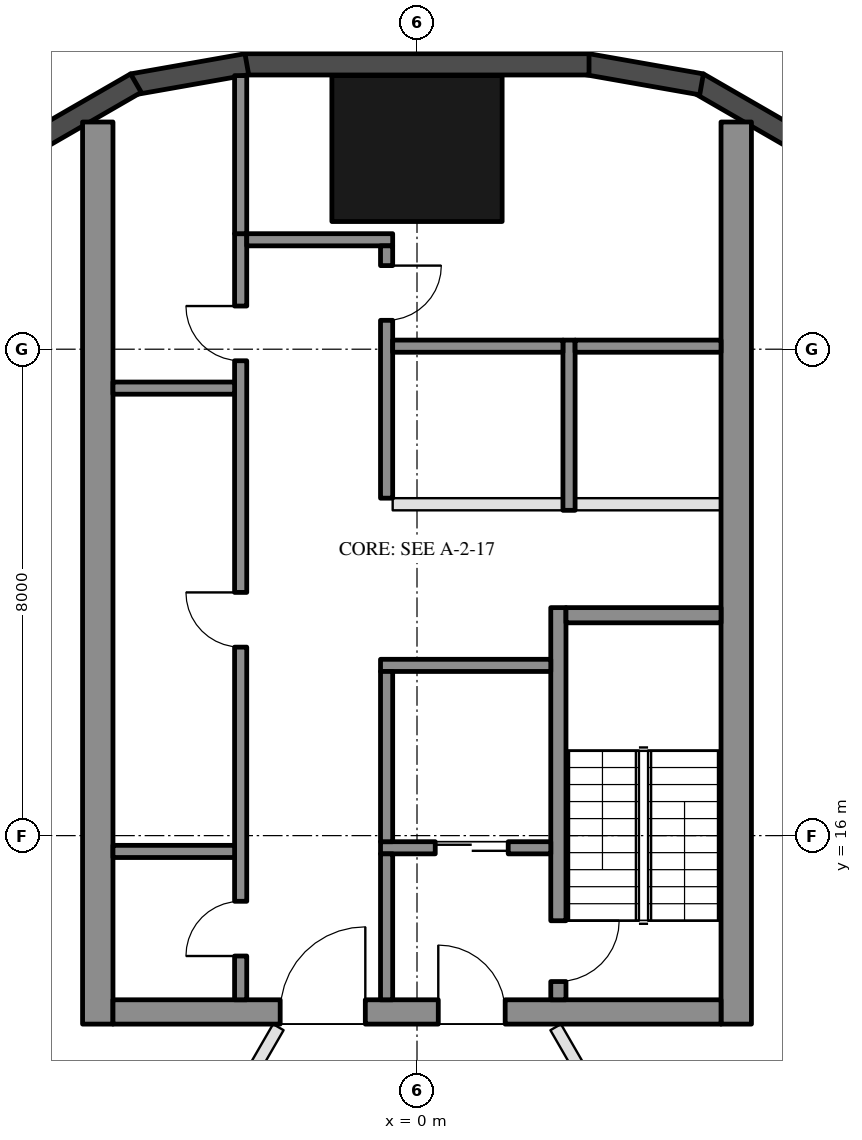
"""IFC4 building model, lengths in metres.
Left out: names, types, materials, properties, quantities, classifications, styles, units other than length and angle.
Written with IfcOpenShell. Run it as: python <this file> out.ifc"""

import sys

from ifc_helpers import new_model, si_unit, direction, frame, frame_2d, origin, origin_2d, place, context, subcontext, project, spatial, rectangle, hollow_rectangle, extrude, element, fill, save


model = new_model("IFC4")
c1 = context("Model", 3, precision=1e-05, world=origin(), true_north=direction((0.0, 1.0)))
c2 = subcontext(c1, "Body", "Model", "MODEL_VIEW")
j1 = project(units=[si_unit("LENGTHUNIT", "METRE"), si_unit("PLANEANGLEUNIT", "RADIAN")], contexts=[c1])
p1 = place(None, origin())
s1 = spatial("IfcSite", under=j1, at=p1, CompositionType="ELEMENT")
p2 = place(p1, origin())
s2 = spatial("IfcBuilding", under=s1, at=p2, CompositionType="ELEMENT")
p3 = place(p2, frame((0.0, 0.0, 83.5)))
s3 = spatial("IfcBuildingStorey", under=s2, at=p3, CompositionType="ELEMENT", Elevation=83.5)
p4 = place(p3, frame((0.0, 27.3, 0.0), z_axis=(0.0, 0.0, 1.0), x_axis=(1.0, 0.0, 0.0)))
e1 = element("IfcColumn", 1, at=p4, inside=s3, PredefinedType="COLUMN", context=c2, shape_type="SweptSolid", body=[
    extrude(hollow_rectangle(XDim=2.8, YDim=2.4, WallThickness=0.07, at=origin_2d()), origin(), (0.0, 0.0, 1.0), 3.7),
])
for number, where, z_axis, x_axis in (
    (2, (6.277, 27.422, 0.0), (0.0, 0.0, 1.0), (-0.866, 0.5, 0.0)),
    (3, (4.68, 28.356, 0.0), (0.0, 0.0, 1.0), (-0.985, 0.174, 0.0)),
):
    element("IfcWall", number, at=place(p3, frame(where, z_axis=z_axis, x_axis=x_axis)), inside=s3, PredefinedType="SOLIDWALL", context=c2, shape_type="SweptSolid", body=[
        extrude(rectangle(XDim=1.91, YDim=0.35, at=frame_2d((0.955, 0.0))), origin(), (0.0, 0.0, 1.0), 3.55),
    ])
p5 = place(p3, frame((2.829, 28.685, 0.0), z_axis=(0.0, 0.0, 1.0), x_axis=(-1.0, 0.0, 0.0)))
e4 = element("IfcWall", 4, at=p5, inside=s3, PredefinedType="SOLIDWALL", context=c2, shape_type="SweptSolid", body=[
    extrude(rectangle(XDim=5.658, YDim=0.35, at=frame_2d((2.829, 0.0))), origin(), (0.0, 0.0, 1.0), 3.55),
])
for number, where, z_axis, x_axis in (
    (5, (-2.799, 28.688, 0.0), (0.0, 0.0, 1.0), (-0.985, -0.174, 0.0)),
    (6, (-4.623, 28.377, 0.0), (0.0, 0.0, 1.0), (-0.866, -0.5, 0.0)),
):
    element("IfcWall", number, at=place(p3, frame(where, z_axis=z_axis, x_axis=x_axis)), inside=s3, PredefinedType="SOLIDWALL", context=c2, shape_type="SweptSolid", body=[
        extrude(rectangle(XDim=1.91, YDim=0.35, at=frame_2d((0.955, 0.0))), origin(), (0.0, 0.0, 1.0), 3.55),
    ])
for number, where, z_axis, x_axis in (
    (7, (5.25, 12.9, 0.0), (0.0, 0.0, 1.0), (0.0, 1.0, 0.0)),
    (8, (-5.25, 12.9, 0.0), (0.0, 0.0, 1.0), (0.0, 1.0, 0.0)),
):
    element("IfcWall", number, at=place(p3, frame(where, z_axis=z_axis, x_axis=x_axis)), inside=s3, PredefinedType="SHEAR", context=c2, shape_type="SweptSolid", body=[
        extrude(rectangle(XDim=14.837, YDim=0.5, at=frame_2d((7.418, 0.0))), origin(), (0.0, 0.0, 1.0), 3.5),
    ])
p6 = place(p3, frame((5.0, 13.1, 0.0), z_axis=(0.0, 0.0, 1.0), x_axis=(-1.0, 0.0, 0.0)))
e9 = element("IfcWall", 9, at=p6, inside=s3, PredefinedType="SHEAR", context=c2, shape_type="SweptSolid", body=[
    extrude(rectangle(XDim=10.0, YDim=0.4, at=frame_2d((5.0, 0.0))), origin(), (0.0, 0.0, 1.0), 3.5),
])
p7 = place(p6, frame((3.55, 0.0, 0.0)))
e10 = element("IfcOpeningElement", 10, at=p7, cuts=e9, PredefinedType="OPENING", context=c2, shape_type="SweptSolid", body=[
    extrude(rectangle(XDim=1.1, YDim=2.1, at=frame_2d((0.55, 1.05))), frame((0.0, 0.21, 0.0), z_axis=(0.0, -1.0, 0.0), x_axis=(1.0, 0.0, 0.0)), (0.0, 0.0, 1.0), 0.42),
])
p8 = place(p6, frame((5.85, 0.0, 0.0)))
e11 = element("IfcOpeningElement", 11, at=p8, cuts=e9, PredefinedType="OPENING", context=c2, shape_type="SweptSolid", body=[
    extrude(rectangle(XDim=1.4, YDim=2.1, at=frame_2d((0.7, 1.05))), frame((0.0, 0.21, 0.0), z_axis=(0.0, -1.0, 0.0), x_axis=(1.0, 0.0, 0.0)), (0.0, 0.0, 1.0), 0.42),
])
p9 = place(p3, frame((2.325, 13.3, 0.0), z_axis=(0.0, 0.0, 1.0), x_axis=(0.0, 1.0, 0.0)))
e12 = element("IfcWall", 12, at=p9, inside=s3, PredefinedType="SHEAR", context=c2, shape_type="SweptSolid", body=[
    extrude(rectangle(XDim=6.45, YDim=0.25, at=frame_2d((3.225, 0.0))), origin(), (0.0, 0.0, 1.0), 3.5),
])
p10 = place(p9, frame((0.3, 0.0, 0.0)))
e13 = element("IfcOpeningElement", 13, at=p10, cuts=e12, PredefinedType="OPENING", context=c2, shape_type="SweptSolid", body=[
    extrude(rectangle(XDim=1.0, YDim=2.1, at=frame_2d((0.5, 1.05))), frame((0.0, 0.135, 0.0), z_axis=(0.0, -1.0, 0.0), x_axis=(1.0, 0.0, 0.0)), (0.0, 0.0, 1.0), 0.27),
])
p11 = place(p3, frame((5.0, 19.625, 0.0), z_axis=(0.0, 0.0, 1.0), x_axis=(-1.0, 0.0, 0.0)))
e14 = element("IfcWall", 14, at=p11, inside=s3, PredefinedType="SHEAR", context=c2, shape_type="SweptSolid", body=[
    extrude(rectangle(XDim=2.55, YDim=0.25, at=frame_2d((1.275, 0.0))), origin(), (0.0, 0.0, 1.0), 3.5),
])
p12 = place(p3, frame((2.2, 18.8, 0.0), z_axis=(0.0, 0.0, 1.0), x_axis=(-1.0, 0.0, 0.0)))
e15 = element("IfcWall", 15, at=p12, inside=s3, PredefinedType="SHEAR", context=c2, shape_type="SweptSolid", body=[
    extrude(rectangle(XDim=2.8, YDim=0.2, at=frame_2d((1.4, 0.0))), origin(), (0.0, 0.0, 1.0), 3.5),
])
p13 = place(p3, frame((2.2, 15.8, 0.0), z_axis=(0.0, 0.0, 1.0), x_axis=(-1.0, 0.0, 0.0)))
e16 = element("IfcWall", 16, at=p13, inside=s3, PredefinedType="SHEAR", context=c2, shape_type="SweptSolid", body=[
    extrude(rectangle(XDim=2.8, YDim=0.2, at=frame_2d((1.4, 0.0))), origin(), (0.0, 0.0, 1.0), 3.5),
])
p14 = place(p13, frame((0.7, 0.0, 0.0)))
e17 = element("IfcOpeningElement", 17, at=p14, cuts=e16, PredefinedType="OPENING", context=c2, shape_type="SweptSolid", body=[
    extrude(rectangle(XDim=1.2, YDim=2.1, at=frame_2d((0.6, 1.05))), frame((0.0, 0.11, 0.0), z_axis=(0.0, -1.0, 0.0), x_axis=(1.0, 0.0, 0.0)), (0.0, 0.0, 1.0), 0.22),
])
p15 = place(p3, frame((-0.5, 15.9, 0.0), z_axis=(0.0, 0.0, 1.0), x_axis=(0.0, 1.0, 0.0)))
e18 = element("IfcWall", 18, at=p15, inside=s3, PredefinedType="SHEAR", context=c2, shape_type="SweptSolid", body=[
    extrude(rectangle(XDim=2.8, YDim=0.2, at=frame_2d((1.4, 0.0))), origin(), (0.0, 0.0, 1.0), 3.5),
])
p16 = place(p3, frame((-0.5, 13.3, 0.0), z_axis=(0.0, 0.0, 1.0), x_axis=(0.0, 1.0, 0.0)))
e19 = element("IfcWall", 19, at=p16, inside=s3, PredefinedType="SHEAR", context=c2, shape_type="SweptSolid", body=[
    extrude(rectangle(XDim=2.4, YDim=0.2, at=frame_2d((1.2, 0.0))), origin(), (0.0, 0.0, 1.0), 3.5),
])
p17 = place(p3, frame((-2.9, 13.3, 0.0), z_axis=(0.0, 0.0, 1.0), x_axis=(0.0, 1.0, 0.0)))
e20 = element("IfcWall", 20, at=p17, inside=s3, PredefinedType="SHEAR", context=c2, shape_type="SweptSolid", body=[
    extrude(rectangle(XDim=12.6, YDim=0.2, at=frame_2d((6.3, 0.0))), origin(), (0.0, 0.0, 1.0), 3.5),
])
p18 = place(p17, frame((0.72, 0.0, 0.0)))
e21 = element("IfcOpeningElement", 21, at=p18, cuts=e20, PredefinedType="OPENING", context=c2, shape_type="SweptSolid", body=[
    extrude(rectangle(XDim=0.9, YDim=2.1, at=frame_2d((0.45, 1.05))), frame((0.0, 0.11, 0.0), z_axis=(0.0, -1.0, 0.0), x_axis=(1.0, 0.0, 0.0)), (0.0, 0.0, 1.0), 0.22),
])
p19 = place(p17, frame((5.8, 0.0, 0.0)))
e22 = element("IfcOpeningElement", 22, at=p19, cuts=e20, PredefinedType="OPENING", context=c2, shape_type="SweptSolid", body=[
    extrude(rectangle(XDim=0.9, YDim=2.1, at=frame_2d((0.45, 1.05))), frame((0.0, 0.11, 0.0), z_axis=(0.0, -1.0, 0.0), x_axis=(1.0, 0.0, 0.0)), (0.0, 0.0, 1.0), 0.22),
])
p20 = place(p17, frame((10.51, 0.0, 0.0)))
e23 = element("IfcOpeningElement", 23, at=p20, cuts=e20, PredefinedType="OPENING", context=c2, shape_type="SweptSolid", body=[
    extrude(rectangle(XDim=0.9, YDim=2.1, at=frame_2d((0.45, 1.05))), frame((0.0, 0.11, 0.0), z_axis=(0.0, -1.0, 0.0), x_axis=(1.0, 0.0, 0.0)), (0.0, 0.0, 1.0), 0.22),
])
p21 = place(p3, frame((-0.4, 25.8, 0.0), z_axis=(0.0, 0.0, 1.0), x_axis=(-1.0, 0.0, 0.0)))
e24 = element("IfcWall", 24, at=p21, inside=s3, PredefinedType="SHEAR", context=c2, shape_type="SweptSolid", body=[
    extrude(rectangle(XDim=2.4, YDim=0.2, at=frame_2d((1.2, 0.0))), origin(), (0.0, 0.0, 1.0), 3.5),
])
p22 = place(p3, frame((-0.5, 21.55, 0.0), z_axis=(0.0, 0.0, 1.0), x_axis=(0.0, 1.0, 0.0)))
e25 = element("IfcWall", 25, at=p22, inside=s3, PredefinedType="SHEAR", context=c2, shape_type="SweptSolid", body=[
    extrude(rectangle(XDim=4.15, YDim=0.2, at=frame_2d((2.075, 0.0))), origin(), (0.0, 0.0, 1.0), 3.5),
])
p23 = place(p22, frame((2.925, 0.0, 0.0)))
e26 = element("IfcOpeningElement", 26, at=p23, cuts=e25, PredefinedType="OPENING", context=c2, shape_type="SweptSolid", body=[
    extrude(rectangle(XDim=0.9, YDim=2.1, at=frame_2d((0.45, 1.05))), frame((0.0, 0.11, 0.0), z_axis=(0.0, -1.0, 0.0), x_axis=(1.0, 0.0, 0.0)), (0.0, 0.0, 1.0), 0.22),
])
for number, where, z_axis, x_axis in (
    (27, (-3.0, 15.74, 0.0), (0.0, 0.0, 1.0), (-1.0, 0.0, 0.0)),
    (28, (-3.0, 23.36, 0.0), (0.0, 0.0, 1.0), (-1.0, 0.0, 0.0)),
):
    element("IfcWall", number, at=place(p3, frame(where, z_axis=z_axis, x_axis=x_axis)), inside=s3, PredefinedType="SHEAR", context=c2, shape_type="SweptSolid", body=[
        extrude(rectangle(XDim=2.0, YDim=0.2, at=frame_2d((1.0, 0.0))), origin(), (0.0, 0.0, 1.0), 3.5),
    ])
p24 = place(p3, frame((-2.9, 25.9, 0.0), z_axis=(0.0, 0.0, 1.0), x_axis=(0.0, 1.0, 0.0)))
e29 = element("IfcWall", 29, at=p24, inside=s3, PredefinedType="SHEAR", context=c2, shape_type="SweptSolid", body=[
    extrude(rectangle(XDim=2.6, YDim=0.2, at=frame_2d((1.3, 0.0))), origin(), (0.0, 0.0, 1.0), 3.5),
])
p25 = place(p3, frame((2.5, 21.35, 0.0), z_axis=(0.0, 0.0, 1.0), x_axis=(0.0, 1.0, 0.0)))
e30 = element("IfcWall", 30, at=p25, inside=s3, PredefinedType="SHEAR", context=c2, shape_type="SweptSolid", body=[
    extrude(rectangle(XDim=2.8, YDim=0.2, at=frame_2d((1.4, 0.0))), origin(), (0.0, 0.0, 1.0), 3.5),
])
p26 = place(p3, frame((5.0, 24.05, 0.0), z_axis=(0.0, 0.0, 1.0), x_axis=(-1.0, 0.0, 0.0)))
e31 = element("IfcWall", 31, at=p26, inside=s3, PredefinedType="SHEAR", context=c2, shape_type="SweptSolid", body=[
    extrude(rectangle(XDim=2.4, YDim=0.2, at=frame_2d((1.2, 0.0))), origin(), (0.0, 0.0, 1.0), 3.5),
])
p27 = place(p3, frame((2.4, 24.05, 0.0), z_axis=(0.0, 0.0, 1.0), x_axis=(-1.0, 0.0, 0.0)))
e32 = element("IfcWall", 32, at=p27, inside=s3, PredefinedType="SHEAR", context=c2, shape_type="SweptSolid", body=[
    extrude(rectangle(XDim=2.8, YDim=0.2, at=frame_2d((1.4, 0.0))), origin(), (0.0, 0.0, 1.0), 3.5),
])
p28 = place(p3, frame((5.0, 21.45, 0.0), z_axis=(0.0, 0.0, 1.0), x_axis=(-1.0, 0.0, 0.0)))
e33 = element("IfcWall", 33, at=p28, inside=s3, PredefinedType="PARTITIONING", context=c2, shape_type="SweptSolid", body=[
    extrude(rectangle(XDim=2.4, YDim=0.2, at=frame_2d((1.2, 0.0))), origin(), (0.0, 0.0, 1.0), 3.5),
])
p29 = place(p3, frame((2.4, 21.45, 0.0), z_axis=(0.0, 0.0, 1.0), x_axis=(-1.0, 0.0, 0.0)))
e34 = element("IfcWall", 34, at=p29, inside=s3, PredefinedType="PARTITIONING", context=c2, shape_type="SweptSolid", body=[
    extrude(rectangle(XDim=2.8, YDim=0.2, at=frame_2d((1.4, 0.0))), origin(), (0.0, 0.0, 1.0), 3.5),
])
p30 = place(p3, frame((2.281, 12.85, 0.0), z_axis=(0.0, 0.0, 1.0), x_axis=(0.500015893381, -0.866016227542, 0.0)))
e35 = element("IfcWall", 35, at=p30, inside=s3, PredefinedType="PARTITIONING", context=c2, shape_type="SweptSolid", body=[
    extrude(rectangle(XDim=6.482, YDim=0.2, at=frame_2d((3.241, 0.0))), origin(), (0.0, 0.0, 1.0), 2.95),
])
p31 = place(p30, frame((2.741, 0.0, 0.0)))
e36 = element("IfcOpeningElement", 36, at=p31, cuts=e35, PredefinedType="OPENING", context=c2, shape_type="SweptSolid", body=[
    extrude(rectangle(XDim=1.0, YDim=2.1, at=frame_2d((0.5, 1.05))), frame((0.0, 0.11, 0.0), z_axis=(0.0, -1.0, 0.0), x_axis=(1.0, 0.0, 0.0)), (0.0, 0.0, 1.0), 0.22),
])
p32 = place(p3, frame((-6.669, 5.249, 0.0), z_axis=(0.0, 0.0, 1.0), x_axis=(0.499992114976, 0.866029956157, 0.0)))
e37 = element("IfcWall", 37, at=p32, inside=s3, PredefinedType="PARTITIONING", context=c2, shape_type="SweptSolid", body=[
    extrude(rectangle(XDim=8.778, YDim=0.2, at=frame_2d((4.389, 0.0))), origin(), (0.0, 0.0, 1.0), 2.95),
])
p33 = place(p32, frame((3.889, 0.0, 0.0)))
e38 = element("IfcOpeningElement", 38, at=p33, cuts=e37, PredefinedType="OPENING", context=c2, shape_type="SweptSolid", body=[
    extrude(rectangle(XDim=1.0, YDim=2.1, at=frame_2d((0.5, 1.05))), frame((0.0, 0.11, 0.0), z_axis=(0.0, -1.0, 0.0), x_axis=(1.0, 0.0, 0.0)), (0.0, 0.0, 1.0), 0.22),
])
p34 = place(p14, origin())
e39 = element("IfcDoor", 39, at=p34, inside=s3, OperationType="DOUBLE_DOOR_SLIDING", PredefinedType="DOOR", context=c2, shape_type="SweptSolid", body=[
    extrude(rectangle(XDim=1.2, YDim=2.1, at=frame_2d((0.6, 1.05))), frame((0.0, 0.025, 0.0), z_axis=(0.0, -1.0, 0.0), x_axis=(1.0, 0.0, 0.0)), (0.0, 0.0, 1.0), 0.05),
])
fill(e17, e39)
p35 = place(p18, origin())
e40 = element("IfcDoor", 40, at=p35, inside=s3, OperationType="SINGLE_SWING_LEFT", PredefinedType="DOOR", context=c2, shape_type="SweptSolid", body=[
    extrude(rectangle(XDim=0.9, YDim=2.1, at=frame_2d((0.45, 1.05))), frame((0.0, 0.025, 0.0), z_axis=(0.0, -1.0, 0.0), x_axis=(1.0, 0.0, 0.0)), (0.0, 0.0, 1.0), 0.05),
])
fill(e21, e40)
p36 = place(p19, origin())
e41 = element("IfcDoor", 41, at=p36, inside=s3, OperationType="SINGLE_SWING_RIGHT", PredefinedType="DOOR", context=c2, shape_type="SweptSolid", body=[
    extrude(rectangle(XDim=0.9, YDim=2.1, at=frame_2d((0.45, 1.05))), frame((0.0, 0.025, 0.0), z_axis=(0.0, -1.0, 0.0), x_axis=(1.0, 0.0, 0.0)), (0.0, 0.0, 1.0), 0.05),
])
fill(e22, e41)
p37 = place(p20, origin())
e42 = element("IfcDoor", 42, at=p37, inside=s3, OperationType="SINGLE_SWING_RIGHT", PredefinedType="DOOR", context=c2, shape_type="SweptSolid", body=[
    extrude(rectangle(XDim=0.9, YDim=2.1, at=frame_2d((0.45, 1.05))), frame((0.0, 0.025, 0.0), z_axis=(0.0, -1.0, 0.0), x_axis=(1.0, 0.0, 0.0)), (0.0, 0.0, 1.0), 0.05),
])
fill(e23, e42)
p38 = place(p23, frame((0.9, 0.0, 0.0), z_axis=(0.0, 0.0, 1.0), x_axis=(-1.0, 0.0, 0.0)))
e43 = element("IfcDoor", 43, at=p38, inside=s3, OperationType="SINGLE_SWING_LEFT", PredefinedType="DOOR", context=c2, shape_type="SweptSolid", body=[
    extrude(rectangle(XDim=0.9, YDim=2.1, at=frame_2d((0.45, 1.05))), frame((0.0, 0.025, 0.0), z_axis=(0.0, -1.0, 0.0), x_axis=(1.0, 0.0, 0.0)), (0.0, 0.0, 1.0), 0.05),
])
fill(e26, e43)
p39 = place(p7, frame((1.1, 0.0, 0.0), z_axis=(0.0, 0.0, 1.0), x_axis=(-1.0, 0.0, 0.0)))
e44 = element("IfcDoor", 44, at=p39, inside=s3, OperationType="SINGLE_SWING_LEFT", PredefinedType="DOOR", context=c2, shape_type="SweptSolid", body=[
    extrude(rectangle(XDim=1.1, YDim=2.1, at=frame_2d((0.55, 1.05))), frame((0.0, 0.025, 0.0), z_axis=(0.0, -1.0, 0.0), x_axis=(1.0, 0.0, 0.0)), (0.0, 0.0, 1.0), 0.05),
])
fill(e10, e44)
p40 = place(p8, frame((1.4, 0.0, 0.0), z_axis=(0.0, 0.0, 1.0), x_axis=(-1.0, 0.0, 0.0)))
e45 = element("IfcDoor", 45, at=p40, inside=s3, OperationType="DOUBLE_DOOR_SINGLE_SWING", PredefinedType="DOOR", context=c2, shape_type="SweptSolid", body=[
    extrude(rectangle(XDim=1.4, YDim=2.1, at=frame_2d((0.7, 1.05))), frame((0.0, 0.025, 0.0), z_axis=(0.0, -1.0, 0.0), x_axis=(1.0, 0.0, 0.0)), (0.0, 0.0, 1.0), 0.05),
])
fill(e11, e45)
p41 = place(p10, frame((1.0, 0.0, 0.0), z_axis=(0.0, 0.0, 1.0), x_axis=(-1.0, 0.0, 0.0)))
e46 = element("IfcDoor", 46, at=p41, inside=s3, OperationType="SINGLE_SWING_LEFT", PredefinedType="DOOR", context=c2, shape_type="SweptSolid", body=[
    extrude(rectangle(XDim=1.0, YDim=2.1, at=frame_2d((0.5, 1.05))), frame((0.0, 0.025, 0.0), z_axis=(0.0, -1.0, 0.0), x_axis=(1.0, 0.0, 0.0)), (0.0, 0.0, 1.0), 0.05),
])
fill(e13, e46)
save(model, sys.argv[1])
